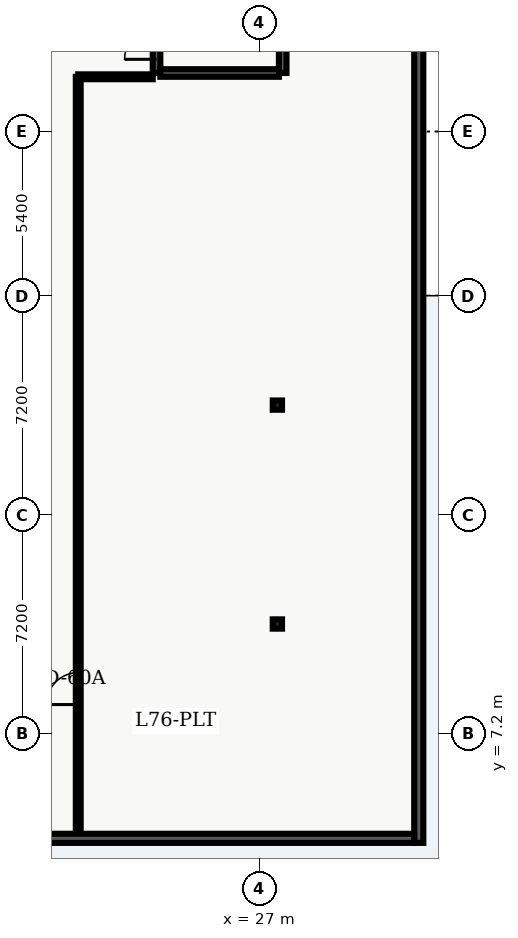
"""IFC4 building model, lengths in metres.
Left out: names, types, materials, properties, quantities, classifications, styles, units other than length and angle.
Written with IfcOpenShell. Run it as: python <this file> out.ifc"""

import sys

from ifc_helpers import new_model, entity, si_unit, converted_unit, direction, frame, origin_with_axes, origin_2d_with_axis, place, context, subcontext, project, spatial, polyline, rectangle, hollow_rectangle, outline, extrude, element, fill, save


model = new_model("IFC4")
c1 = context("Model", 3, precision=1e-05, world=origin_with_axes(), true_north=direction((0.0, 1.0)))
c2 = subcontext(c1, "Body", "Model", "MODEL_VIEW")
j1 = project(units=[si_unit("LENGTHUNIT", "METRE"), converted_unit("PLANEANGLEUNIT", "DEGREE", entity("IfcPlaneAngleMeasure", 0.017), si_unit("PLANEANGLEUNIT", "RADIAN"), dimensions=[0, 0, 0, 0, 0, 0, 0])], contexts=[c1])
p1 = place(None, origin_with_axes())
s1 = spatial("IfcSite", under=j1, at=p1, CompositionType="ELEMENT")
p2 = place(p1, origin_with_axes())
s2 = spatial("IfcBuilding", under=s1, at=p2, CompositionType="ELEMENT")
p3 = place(p2, frame((0.0, 0.0, 308.7), z_axis=(0.0, 0.0, 1.0), x_axis=(1.0, 0.0, 0.0)))
s3 = spatial("IfcBuildingStorey", under=s2, at=p3, CompositionType="ELEMENT", Elevation=308.7)
p4 = place(p3, frame((23.625, 28.925, 0.0), z_axis=(0.0, 0.0, 1.0), x_axis=(0.0, 1.0, 0.0)))
e1 = element("IfcWall", 1, at=p4, inside=s3, PredefinedType="SHEAR", context=c2, shape_type="SweptSolid", body=[
    extrude(outline(polyline([(0.0, -0.125), (8.65, -0.125), (8.65, 0.125), (0.0, 0.125), (0.0, -0.125)])), origin_with_axes(), (0.0, 0.0, 1.0), 3.64),
])
p5 = place(p4, frame((0.975, 0.0, 0.0), z_axis=(0.0, 0.0, 1.0), x_axis=(1.0, 0.0, 0.0)))
e2 = element("IfcOpeningElement", 2, at=p5, cuts=e1, PredefinedType="OPENING", context=c2, shape_type="SweptSolid", body=[
    extrude(rectangle(XDim=1.05, YDim=0.27, at=origin_2d_with_axis()), origin_with_axes(), (0.0, 0.0, 1.0), 2.15),
])
p6 = place(p3, frame((27.775, 28.925, 0.0), z_axis=(0.0, 0.0, 1.0), x_axis=(0.0, 1.0, 0.0)))
e3 = element("IfcWall", 3, at=p6, inside=s3, PredefinedType="SHEAR", context=c2, shape_type="SweptSolid", body=[
    extrude(outline(polyline([(0.0, -0.125), (8.65, -0.125), (8.65, 0.125), (0.0, 0.125), (0.0, -0.125)])), origin_with_axes(), (0.0, 0.0, 1.0), 3.64),
])
p7 = place(p3, frame((23.75, 28.925, 0.0), z_axis=(0.0, 0.0, 1.0), x_axis=(1.0, 0.0, 0.0)))
e4 = element("IfcWall", 4, at=p7, inside=s3, PredefinedType="SHEAR", context=c2, shape_type="SweptSolid", body=[
    extrude(outline(polyline([(0.0, -0.125), (3.9, -0.125), (3.9, 0.125), (0.0, 0.125), (0.0, -0.125)])), origin_with_axes(), (0.0, 0.0, 1.0), 3.64),
])
for number, where, z_axis, x_axis in (
    (5, (27.6, 10.8, 0.0), (0.0, 0.0, 1.0), (1.0, 0.0, 0.0)),
    (6, (27.6, 18.0, 0.0), (0.0, 0.0, 1.0), (1.0, 0.0, 0.0)),
):
    element("IfcColumn", number, at=place(p3, frame(where, z_axis=z_axis, x_axis=x_axis)), inside=s3, PredefinedType="COLUMN", context=c2, shape_type="SweptSolid", body=[
        extrude(hollow_rectangle(XDim=0.305, YDim=0.305, WallThickness=0.015, InnerFilletRadius=0.015, OuterFilletRadius=0.03, at=origin_2d_with_axis()), origin_with_axes(), (0.0, 0.0, 1.0), 3.9),
    ])
p8 = place(p3, frame((21.05, 3.895, 0.0), z_axis=(0.0, 0.0, 1.0), x_axis=(0.0, 1.0, 0.0)))
e7 = element("IfcWall", 7, at=p8, inside=s3, PredefinedType="PARTITIONING", context=c2, shape_type="SweptSolid", body=[
    extrude(outline(polyline([(0.0, -0.08), (24.905, -0.08), (24.905, 0.08), (0.0, 0.08), (0.0, -0.08)])), origin_with_axes(), (0.0, 0.0, 1.0), 2.68),
])
p9 = place(p8, frame((4.78, 0.0, 0.0), z_axis=(0.0, 0.0, 1.0), x_axis=(1.0, 0.0, 0.0)))
e8 = element("IfcOpeningElement", 8, at=p9, cuts=e7, PredefinedType="OPENING", context=c2, shape_type="SweptSolid", body=[
    extrude(rectangle(XDim=1.05, YDim=0.18, at=origin_2d_with_axis()), origin_with_axes(), (0.0, 0.0, 1.0), 2.15),
])
p10 = place(p3, frame((21.05, 28.8, 0.0), z_axis=(0.0, 0.0, 1.0), x_axis=(1.0, 0.0, 0.0)))
e9 = element("IfcWall", 9, at=p10, inside=s3, PredefinedType="PARTITIONING", context=c2, shape_type="SweptSolid", body=[
    extrude(outline(polyline([(0.0, -0.08), (2.45, -0.08), (2.45, 0.08), (0.0, 0.08), (0.0, -0.08)])), origin_with_axes(), (0.0, 0.0, 1.0), 2.68),
])
p11 = place(p3, frame((32.25, 31.0, 0.0), z_axis=(0.0, 0.0, 1.0), x_axis=(0.0, -1.0, 0.0)))
e10 = element("IfcWall", 10, at=p11, inside=s3, PredefinedType="SOLIDWALL", context=c2, shape_type="SweptSolid", body=[
    extrude(outline(polyline([(0.0, -0.15), (27.4, -0.15), (27.4, 0.15), (0.0, 0.15), (0.0, -0.15)])), origin_with_axes(), (0.0, 0.0, 1.0), 3.64),
])
p12 = place(p3, frame((32.1, 3.75, 0.0), z_axis=(0.0, 0.0, 1.0), x_axis=(-1.0, 0.0, 0.0)))
e11 = element("IfcWall", 11, at=p12, inside=s3, PredefinedType="SOLIDWALL", context=c2, shape_type="SweptSolid", body=[
    extrude(outline(polyline([(0.0, -0.15), (22.5, -0.15), (22.5, 0.15), (0.0, 0.15), (0.0, -0.15)])), origin_with_axes(), (0.0, 0.0, 1.0), 3.64),
])
p13 = place(p4, frame((0.975, 0.0, 0.0), z_axis=(0.0, 0.0, 1.0), x_axis=(1.0, 0.0, 0.0)))
e12 = element("IfcDoor", 12, at=p13, inside=s3, OperationType="SINGLE_SWING_LEFT", PredefinedType="DOOR", context=c2, shape_type="SweptSolid", body=[
    extrude(rectangle(XDim=1.05, YDim=0.09, at=origin_2d_with_axis()), origin_with_axes(), (0.0, 0.0, 1.0), 2.15),
])
fill(e2, e12)
p14 = place(p8, frame((4.78, 0.0, 0.0), z_axis=(0.0, 0.0, 1.0), x_axis=(1.0, 0.0, 0.0)))
e13 = element("IfcDoor", 13, at=p14, inside=s3, OperationType="SINGLE_SWING_LEFT", PredefinedType="DOOR", context=c2, shape_type="SweptSolid", body=[
    extrude(rectangle(XDim=1.05, YDim=0.09, at=origin_2d_with_axis()), origin_with_axes(), (0.0, 0.0, 1.0), 2.15),
])
fill(e8, e13)
save(model, sys.argv[1])
